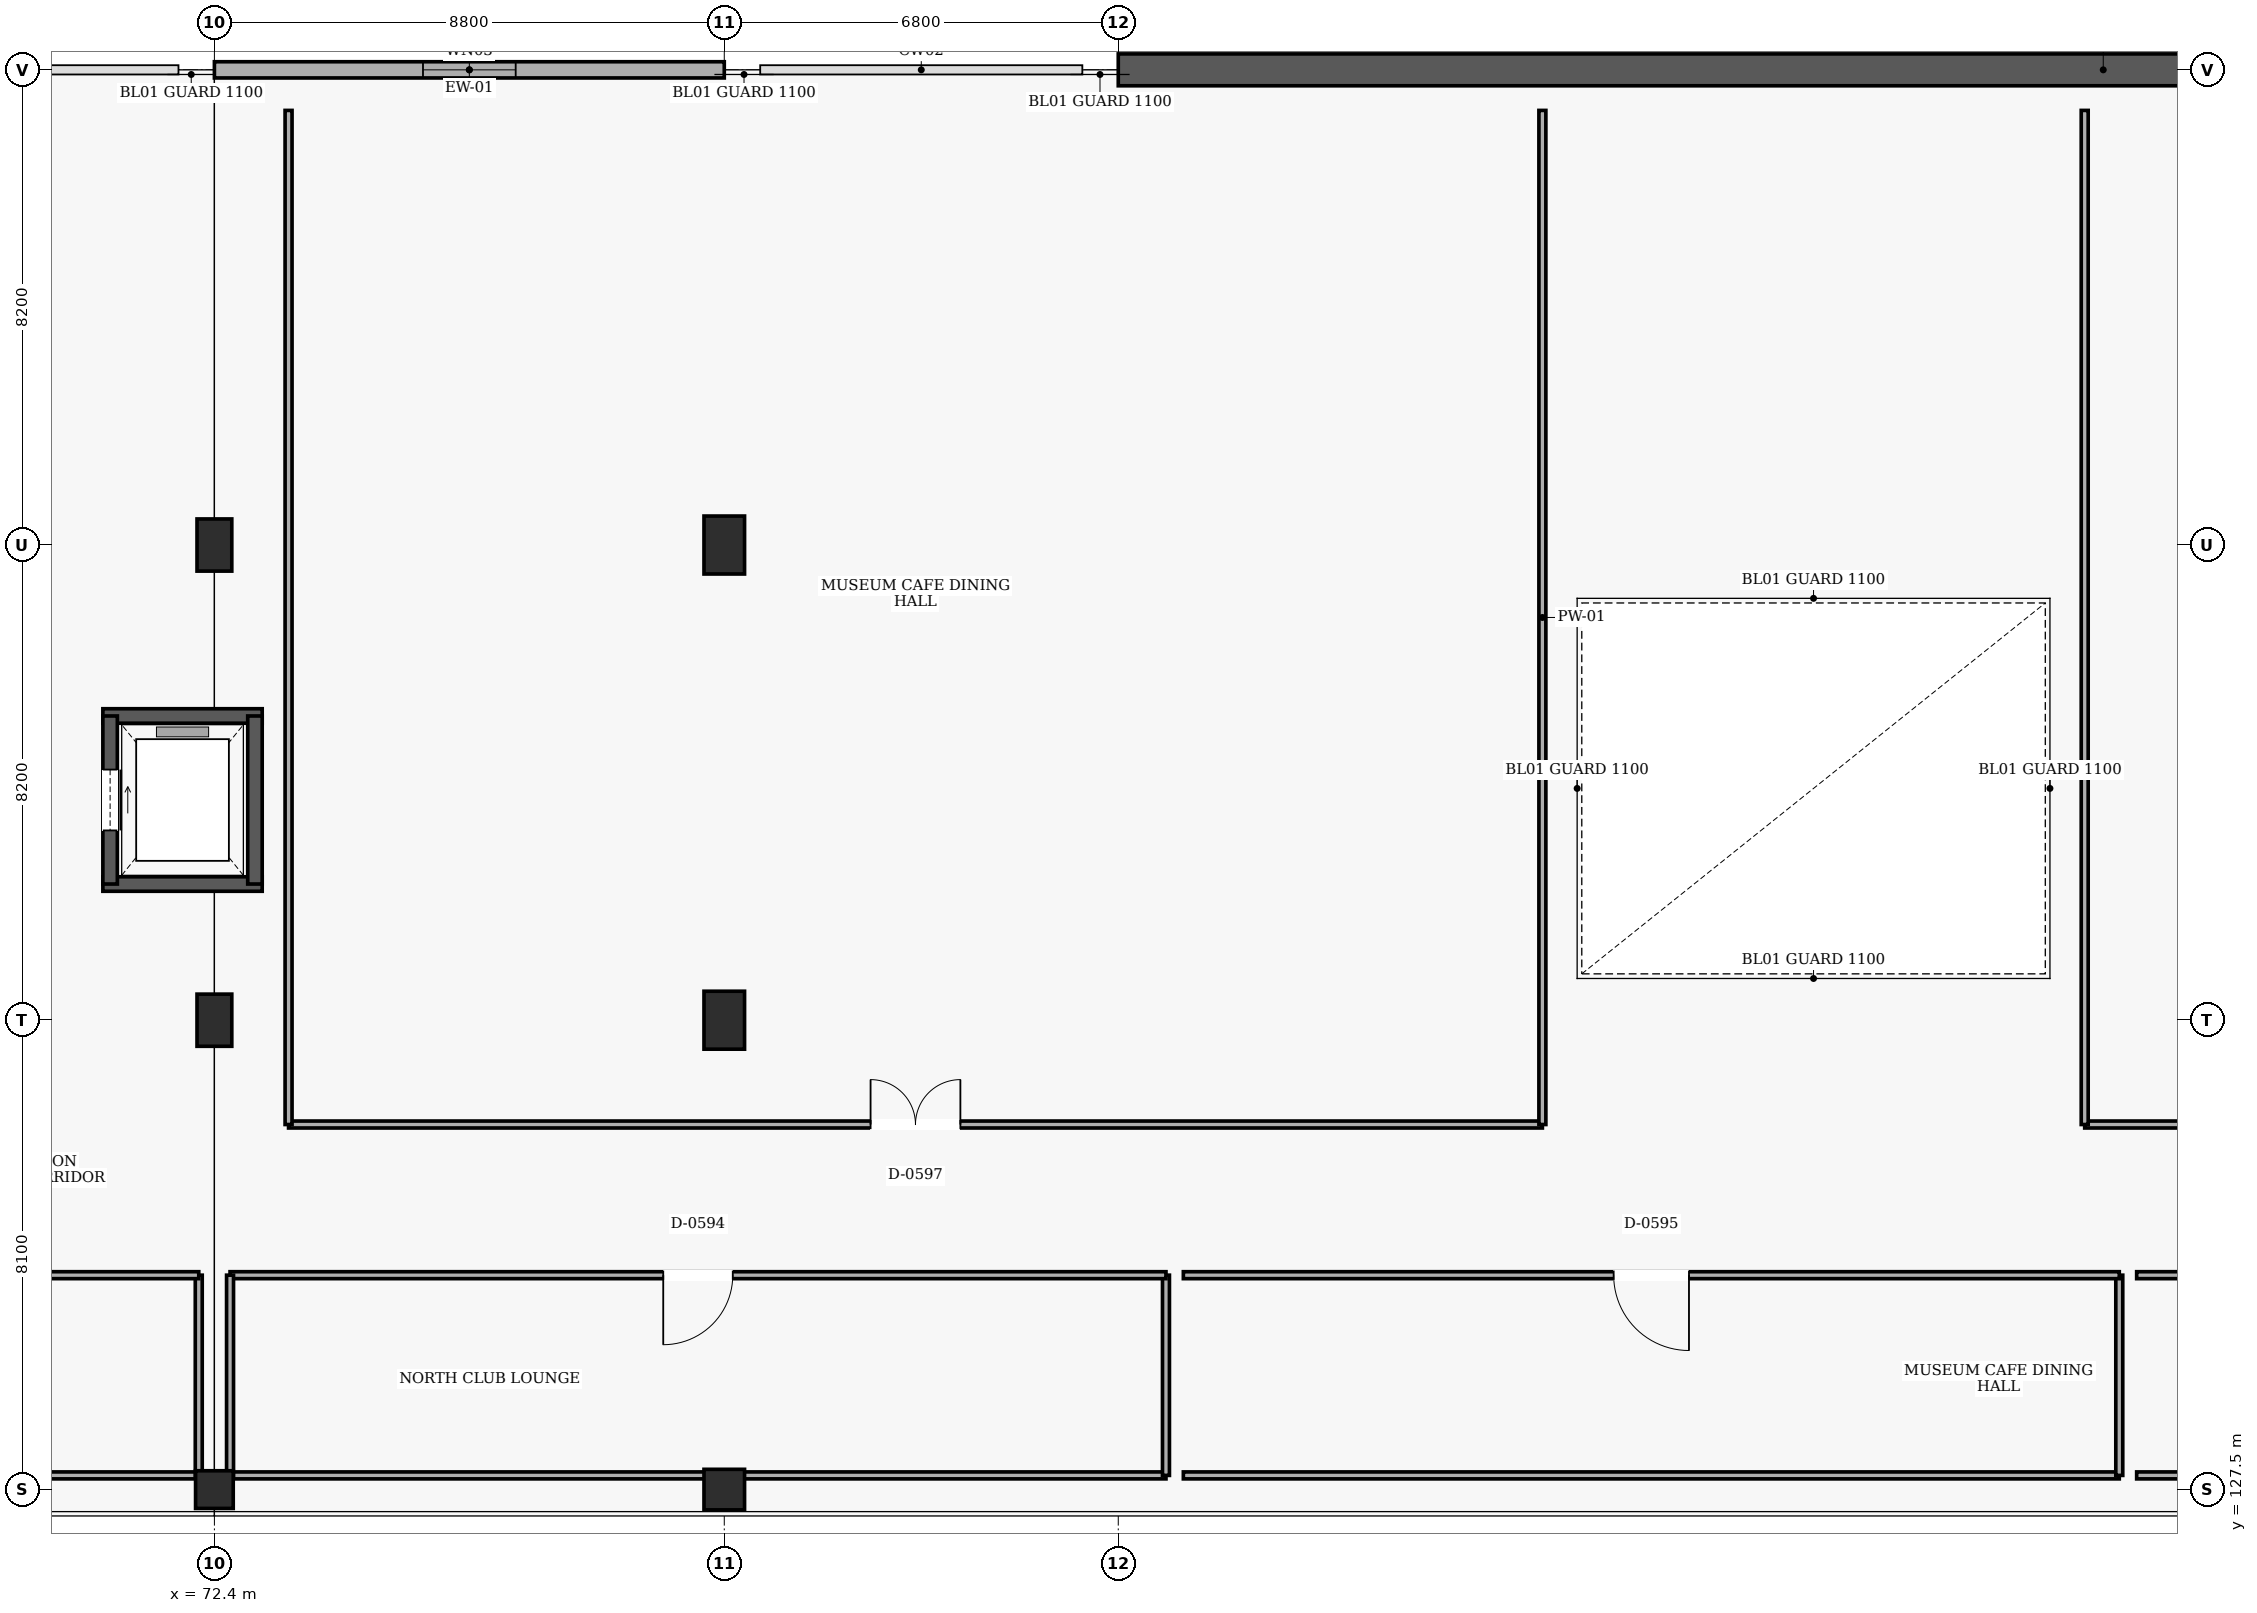
"""IFC4 building model, lengths in metres.
Left out: names, types, materials, properties, quantities, classifications, styles, units other than length and angle.
Written with IfcOpenShell. Run it as: python <this file> out.ifc"""

import sys

from ifc_helpers import new_model, si_unit, direction, frame, frame_2d, origin, origin_2d, place, context, subcontext, project, spatial, rectangle, extrude, element, fill, save


model = new_model("IFC4")
c1 = context("Model", 3, precision=1e-05, world=origin(), true_north=direction((0.0, 1.0)))
c2 = subcontext(c1, "Body", "Model", "MODEL_VIEW")
j1 = project(units=[si_unit("LENGTHUNIT", "METRE"), si_unit("PLANEANGLEUNIT", "RADIAN")], contexts=[c1])
p1 = place(None, origin())
s1 = spatial("IfcSite", under=j1, at=p1, CompositionType="ELEMENT")
p2 = place(p1, origin())
s2 = spatial("IfcBuilding", under=s1, at=p2, CompositionType="ELEMENT")
p3 = place(p2, frame((0.0, 0.0, 10.2)))
s3 = spatial("IfcBuildingStorey", under=s2, at=p3, CompositionType="ELEMENT", Elevation=10.2)
p4 = place(p3, frame((72.4, 127.5, 0.0), z_axis=(0.0, 0.0, 1.0), x_axis=(1.0, 0.0, 0.0)))
e1 = element("IfcColumn", 1, at=p4, inside=s3, PredefinedType="COLUMN", context=c2, shape_type="SweptSolid", body=[
    extrude(rectangle(XDim=0.65, YDim=0.65, at=origin_2d()), origin(), (0.0, 0.0, 1.0), 4.8),
])
for number, where, z_axis, x_axis in (
    (2, (72.4, 135.6, 0.0), (0.0, 0.0, 1.0), (1.0, 0.0, 0.0)),
    (3, (72.4, 143.8, 0.0), (0.0, 0.0, 1.0), (1.0, 0.0, 0.0)),
):
    element("IfcColumn", number, at=place(p3, frame(where, z_axis=z_axis, x_axis=x_axis)), inside=s3, PredefinedType="COLUMN", context=c2, shape_type="SweptSolid", body=[
        extrude(rectangle(XDim=0.6, YDim=0.9, at=origin_2d()), origin(), (0.0, 0.0, 1.0), 4.8),
    ])
p5 = place(p3, frame((81.2, 127.5, 0.0), z_axis=(0.0, 0.0, 1.0), x_axis=(1.0, 0.0, 0.0)))
e4 = element("IfcColumn", 4, at=p5, inside=s3, PredefinedType="COLUMN", context=c2, shape_type="SweptSolid", body=[
    extrude(rectangle(XDim=0.7, YDim=0.7, at=origin_2d()), origin(), (0.0, 0.0, 1.0), 4.8),
])
for number, where, z_axis, x_axis in (
    (5, (81.2, 135.6, 0.0), (0.0, 0.0, 1.0), (1.0, 0.0, 0.0)),
    (6, (81.2, 143.8, 0.0), (0.0, 0.0, 1.0), (1.0, 0.0, 0.0)),
):
    element("IfcColumn", number, at=place(p3, frame(where, z_axis=z_axis, x_axis=x_axis)), inside=s3, PredefinedType="COLUMN", context=c2, shape_type="SweptSolid", body=[
        extrude(rectangle(XDim=0.7, YDim=1.0, at=origin_2d()), origin(), (0.0, 0.0, 1.0), 4.8),
    ])
p6 = place(p3, frame((72.4, 152.0, 0.0), z_axis=(0.0, 0.0, 1.0), x_axis=(1.0, 0.0, 0.0)))
e7 = element("IfcWall", 7, at=p6, inside=s3, PredefinedType="SOLIDWALL", context=c2, shape_type="SweptSolid", body=[
    extrude(rectangle(XDim=8.8, YDim=0.28, at=frame_2d((4.4, 0.0))), origin(), (0.0, 0.0, 1.0), 4.48),
])
p7 = place(p6, frame((3.6, 0.0, 0.9)))
e8 = element("IfcOpeningElement", 8, at=p7, cuts=e7, PredefinedType="OPENING", context=c2, shape_type="SweptSolid", body=[
    extrude(rectangle(XDim=1.6, YDim=1.5, at=frame_2d((0.8, 0.75))), frame((0.0, 0.15, 0.0), z_axis=(0.0, -1.0, 0.0), x_axis=(1.0, 0.0, 0.0)), (0.0, 0.0, 1.0), 0.3),
])
p8 = place(p3, frame((88.0, 152.0, 0.0), z_axis=(0.0, 0.0, 1.0), x_axis=(1.0, 0.0, 0.0)))
e9 = element("IfcWall", 9, at=p8, inside=s3, PredefinedType="SHEAR", context=c2, shape_type="SweptSolid", body=[
    extrude(rectangle(XDim=34.0, YDim=0.55, at=frame_2d((17.0, 0.0))), origin(), (0.0, 0.0, 1.0), 4.48),
])
for number, where, z_axis, x_axis in (
    (10, (70.475, 137.95, 0.0), (0.0, 0.0, 1.0), (1.0, 0.0, 0.0)),
    (11, (73.225, 140.85, 0.0), (0.0, 0.0, 1.0), (-1.0, 0.0, 0.0)),
):
    element("IfcWall", number, at=place(p3, frame(where, z_axis=z_axis, x_axis=x_axis)), inside=s3, PredefinedType="SHEAR", context=c2, shape_type="SweptSolid", body=[
        extrude(rectangle(XDim=2.75, YDim=0.25, at=frame_2d((1.375, 0.0))), origin(), (0.0, 0.0, 1.0), 4.48),
    ])
p9 = place(p3, frame((70.6, 140.85, 0.0), z_axis=(0.0, 0.0, 1.0), x_axis=(0.0, -1.0, 0.0)))
e12 = element("IfcWall", 12, at=p9, inside=s3, PredefinedType="SHEAR", context=c2, shape_type="SweptSolid", body=[
    extrude(rectangle(XDim=2.9, YDim=0.25, at=frame_2d((1.45, 0.0))), origin(), (0.0, 0.0, 1.0), 4.48),
])
p10 = place(p9, frame((0.925, 0.0, 0.0)))
e13 = element("IfcOpeningElement", 13, at=p10, cuts=e12, PredefinedType="OPENING", context=c2, shape_type="SweptSolid", body=[
    extrude(rectangle(XDim=1.05, YDim=2.15, at=frame_2d((0.525, 1.075))), frame((0.0, 0.135, 0.0), z_axis=(0.0, -1.0, 0.0), x_axis=(1.0, 0.0, 0.0)), (0.0, 0.0, 1.0), 0.27),
])
p11 = place(p3, frame((73.1, 137.95, 0.0), z_axis=(0.0, 0.0, 1.0), x_axis=(0.0, 1.0, 0.0)))
e14 = element("IfcWall", 14, at=p11, inside=s3, PredefinedType="SHEAR", context=c2, shape_type="SweptSolid", body=[
    extrude(rectangle(XDim=2.9, YDim=0.25, at=frame_2d((1.45, 0.0))), origin(), (0.0, 0.0, 1.0), 4.48),
])
p12 = place(p3, frame((48.712, 127.745, 0.0), z_axis=(0.0, 0.0, 1.0), x_axis=(1.0, 0.0, 0.0)))
e15 = element("IfcWall", 15, at=p12, inside=s3, PredefinedType="PARTITIONING", context=c2, shape_type="SweptSolid", body=[
    extrude(rectangle(XDim=23.417, YDim=0.12, at=frame_2d((11.709, 0.0))), origin(), (0.0, 0.0, 1.0), 3.86),
])
p13 = place(p3, frame((72.13, 127.745, 0.0), z_axis=(0.0, 0.0, 1.0), x_axis=(0.0, 1.0, 0.0)))
e16 = element("IfcWall", 16, at=p13, inside=s3, PredefinedType="PARTITIONING", context=c2, shape_type="SweptSolid", body=[
    extrude(rectangle(XDim=3.455, YDim=0.12, at=frame_2d((1.728, 0.0))), origin(), (0.0, 0.0, 1.0), 3.76),
])
p14 = place(p3, frame((72.13, 131.2, 0.0), z_axis=(0.0, 0.0, 1.0), x_axis=(-1.0, 0.0, 0.0)))
e17 = element("IfcWall", 17, at=p14, inside=s3, PredefinedType="PARTITIONING", context=c2, shape_type="SweptSolid", body=[
    extrude(rectangle(XDim=23.417, YDim=0.12, at=frame_2d((11.709, 0.0))), origin(), (0.0, 0.0, 1.0), 4.48),
])
p15 = place(p14, frame((11.209, 0.0, 0.0)))
e18 = element("IfcOpeningElement", 18, at=p15, cuts=e17, PredefinedType="OPENING", context=c2, shape_type="SweptSolid", body=[
    extrude(rectangle(XDim=1.0, YDim=2.1, at=frame_2d((0.5, 1.05))), frame((0.0, 0.07, 0.0), z_axis=(0.0, -1.0, 0.0), x_axis=(1.0, 0.0, 0.0)), (0.0, 0.0, 1.0), 0.14),
])
p16 = place(p3, frame((72.67, 127.745, 0.0), z_axis=(0.0, 0.0, 1.0), x_axis=(1.0, 0.0, 0.0)))
e19 = element("IfcWall", 19, at=p16, inside=s3, PredefinedType="PARTITIONING", context=c2, shape_type="SweptSolid", body=[
    extrude(rectangle(XDim=16.153, YDim=0.12, at=frame_2d((8.077, 0.0))), origin(), (0.0, 0.0, 1.0), 3.86),
])
p17 = place(p3, frame((88.823, 127.745, 0.0), z_axis=(0.0, 0.0, 1.0), x_axis=(0.0, 1.0, 0.0)))
e20 = element("IfcWall", 20, at=p17, inside=s3, PredefinedType="PARTITIONING", context=c2, shape_type="SweptSolid", body=[
    extrude(rectangle(XDim=3.455, YDim=0.12, at=frame_2d((1.728, 0.0))), origin(), (0.0, 0.0, 1.0), 4.48),
])
p18 = place(p3, frame((88.823, 131.2, 0.0), z_axis=(0.0, 0.0, 1.0), x_axis=(-1.0, 0.0, 0.0)))
e21 = element("IfcWall", 21, at=p18, inside=s3, PredefinedType="PARTITIONING", context=c2, shape_type="SweptSolid", body=[
    extrude(rectangle(XDim=16.153, YDim=0.12, at=frame_2d((8.077, 0.0))), origin(), (0.0, 0.0, 1.0), 4.48),
])
p19 = place(p18, frame((7.477, 0.0, 0.0)))
e22 = element("IfcOpeningElement", 22, at=p19, cuts=e21, PredefinedType="OPENING", context=c2, shape_type="SweptSolid", body=[
    extrude(rectangle(XDim=1.2, YDim=2.15, at=frame_2d((0.6, 1.075))), frame((0.0, 0.07, 0.0), z_axis=(0.0, -1.0, 0.0), x_axis=(1.0, 0.0, 0.0)), (0.0, 0.0, 1.0), 0.14),
])
p20 = place(p3, frame((72.67, 131.2, 0.0), z_axis=(0.0, 0.0, 1.0), x_axis=(0.0, -1.0, 0.0)))
e23 = element("IfcWall", 23, at=p20, inside=s3, PredefinedType="PARTITIONING", context=c2, shape_type="SweptSolid", body=[
    extrude(rectangle(XDim=3.455, YDim=0.12, at=frame_2d((1.728, 0.0))), origin(), (0.0, 0.0, 1.0), 3.76),
])
p21 = place(p3, frame((89.123, 127.745, 0.0), z_axis=(0.0, 0.0, 1.0), x_axis=(1.0, 0.0, 0.0)))
e24 = element("IfcWall", 24, at=p21, inside=s3, PredefinedType="PARTITIONING", context=c2, shape_type="SweptSolid", body=[
    extrude(rectangle(XDim=16.153, YDim=0.12, at=frame_2d((8.077, 0.0))), origin(), (0.0, 0.0, 1.0), 4.48),
])
p22 = place(p3, frame((105.277, 127.745, 0.0), z_axis=(0.0, 0.0, 1.0), x_axis=(0.0, 1.0, 0.0)))
e25 = element("IfcWall", 25, at=p22, inside=s3, PredefinedType="PARTITIONING", context=c2, shape_type="SweptSolid", body=[
    extrude(rectangle(XDim=3.455, YDim=0.12, at=frame_2d((1.728, 0.0))), origin(), (0.0, 0.0, 1.0), 4.48),
])
p23 = place(p3, frame((105.277, 131.2, 0.0), z_axis=(0.0, 0.0, 1.0), x_axis=(-1.0, 0.0, 0.0)))
e26 = element("IfcWall", 26, at=p23, inside=s3, PredefinedType="PARTITIONING", context=c2, shape_type="SweptSolid", body=[
    extrude(rectangle(XDim=16.153, YDim=0.12, at=frame_2d((8.077, 0.0))), origin(), (0.0, 0.0, 1.0), 4.48),
])
p24 = place(p23, frame((7.427, 0.0, 0.0)))
e27 = element("IfcOpeningElement", 27, at=p24, cuts=e26, PredefinedType="OPENING", context=c2, shape_type="SweptSolid", body=[
    extrude(rectangle(XDim=1.3, YDim=2.2, at=frame_2d((0.65, 1.1))), frame((0.0, 0.07, 0.0), z_axis=(0.0, -1.0, 0.0), x_axis=(1.0, 0.0, 0.0)), (0.0, 0.0, 1.0), 0.14),
])
p25 = place(p3, frame((105.577, 127.745, 0.0), z_axis=(0.0, 0.0, 1.0), x_axis=(1.0, 0.0, 0.0)))
e28 = element("IfcWall", 28, at=p25, inside=s3, PredefinedType="PARTITIONING", context=c2, shape_type="SweptSolid", body=[
    extrude(rectangle(XDim=16.153, YDim=0.12, at=frame_2d((8.077, 0.0))), origin(), (0.0, 0.0, 1.0), 4.48),
])
p26 = place(p3, frame((121.73, 131.2, 0.0), z_axis=(0.0, 0.0, 1.0), x_axis=(-1.0, 0.0, 0.0)))
e29 = element("IfcWall", 29, at=p26, inside=s3, PredefinedType="PARTITIONING", context=c2, shape_type="SweptSolid", body=[
    extrude(rectangle(XDim=16.153, YDim=0.12, at=frame_2d((8.077, 0.0))), origin(), (0.0, 0.0, 1.0), 4.48),
])
p27 = place(p26, frame((7.377, 0.0, 0.0)))
e30 = element("IfcOpeningElement", 30, at=p27, cuts=e29, PredefinedType="OPENING", context=c2, shape_type="SweptSolid", body=[
    extrude(rectangle(XDim=1.4, YDim=2.2, at=frame_2d((0.7, 1.1))), frame((0.0, 0.07, 0.0), z_axis=(0.0, -1.0, 0.0), x_axis=(1.0, 0.0, 0.0)), (0.0, 0.0, 1.0), 0.14),
])
p28 = place(p3, frame((73.68, 133.8, 0.0), z_axis=(0.0, 0.0, 1.0), x_axis=(1.0, 0.0, 0.0)))
e31 = element("IfcWall", 31, at=p28, inside=s3, PredefinedType="PARTITIONING", context=c2, shape_type="SweptSolid", body=[
    extrude(rectangle(XDim=21.64, YDim=0.12, at=frame_2d((10.82, 0.0))), origin(), (0.0, 0.0, 1.0), 4.48),
])
p29 = place(p28, frame((10.045, 0.0, 0.0)))
e32 = element("IfcOpeningElement", 32, at=p29, cuts=e31, PredefinedType="OPENING", context=c2, shape_type="SweptSolid", body=[
    extrude(rectangle(XDim=1.55, YDim=2.2, at=frame_2d((0.775, 1.1))), frame((0.0, 0.07, 0.0), z_axis=(0.0, -1.0, 0.0), x_axis=(1.0, 0.0, 0.0)), (0.0, 0.0, 1.0), 0.14),
])
for number, where, z_axis, x_axis in (
    (33, (95.32, 133.8, 0.0), (0.0, 0.0, 1.0), (0.0, 1.0, 0.0)),
    (34, (73.68, 151.3, 0.0), (0.0, 0.0, 1.0), (0.0, -1.0, 0.0)),
):
    element("IfcWall", number, at=place(p3, frame(where, z_axis=z_axis, x_axis=x_axis)), inside=s3, PredefinedType="PARTITIONING", context=c2, shape_type="SweptSolid", body=[
        extrude(rectangle(XDim=17.5, YDim=0.12, at=frame_2d((8.75, 0.0))), origin(), (0.0, 0.0, 1.0), 4.48),
    ])
p30 = place(p3, frame((104.68, 133.8, 0.0), z_axis=(0.0, 0.0, 1.0), x_axis=(1.0, 0.0, 0.0)))
e35 = element("IfcWall", 35, at=p30, inside=s3, PredefinedType="PARTITIONING", context=c2, shape_type="SweptSolid", body=[
    extrude(rectangle(XDim=17.05, YDim=0.12, at=frame_2d((8.525, 0.0))), origin(), (0.0, 0.0, 1.0), 4.48),
])
p31 = place(p30, frame((7.685, 0.0, 0.0)))
e36 = element("IfcOpeningElement", 36, at=p31, cuts=e35, PredefinedType="OPENING", context=c2, shape_type="SweptSolid", body=[
    extrude(rectangle(XDim=1.68, YDim=2.25, at=frame_2d((0.84, 1.125))), frame((0.0, 0.07, 0.0), z_axis=(0.0, -1.0, 0.0), x_axis=(1.0, 0.0, 0.0)), (0.0, 0.0, 1.0), 0.14),
])
p32 = place(p3, frame((104.68, 151.3, 0.0), z_axis=(0.0, 0.0, 1.0), x_axis=(0.0, -1.0, 0.0)))
e37 = element("IfcWall", 37, at=p32, inside=s3, PredefinedType="PARTITIONING", context=c2, shape_type="SweptSolid", body=[
    extrude(rectangle(XDim=17.5, YDim=0.12, at=frame_2d((8.75, 0.0))), origin(), (0.0, 0.0, 1.0), 4.48),
])
p33 = place(p7, origin())
e38 = element("IfcWindow", 38, at=p33, inside=s3, PartitioningType="SINGLE_PANEL", PredefinedType="WINDOW", context=c2, shape_type="SweptSolid", body=[
    extrude(rectangle(XDim=1.6, YDim=1.5, at=frame_2d((0.8, 0.75))), frame((0.0, 0.03, 0.0), z_axis=(0.0, -1.0, 0.0), x_axis=(1.0, 0.0, 0.0)), (0.0, 0.0, 1.0), 0.06),
])
fill(e8, e38)
p34 = place(p10, origin())
e39 = element("IfcDoor", 39, at=p34, inside=s3, OperationType="SLIDING_TO_RIGHT", PredefinedType="DOOR", context=c2, shape_type="SweptSolid", body=[
    extrude(rectangle(XDim=1.05, YDim=2.15, at=frame_2d((0.525, 1.075))), frame((0.0, 0.025, 0.0), z_axis=(0.0, -1.0, 0.0), x_axis=(1.0, 0.0, 0.0)), (0.0, 0.0, 1.0), 0.05),
])
fill(e13, e39)
p35 = place(p19, origin())
e40 = element("IfcDoor", 40, at=p35, inside=s3, OperationType="SINGLE_SWING_RIGHT", PredefinedType="DOOR", context=c2, shape_type="SweptSolid", body=[
    extrude(rectangle(XDim=1.2, YDim=2.15, at=frame_2d((0.6, 1.075))), frame((0.0, 0.025, 0.0), z_axis=(0.0, -1.0, 0.0), x_axis=(1.0, 0.0, 0.0)), (0.0, 0.0, 1.0), 0.05),
])
fill(e22, e40)
p36 = place(p24, origin())
e41 = element("IfcDoor", 41, at=p36, inside=s3, OperationType="SINGLE_SWING_LEFT", PredefinedType="DOOR", context=c2, shape_type="SweptSolid", body=[
    extrude(rectangle(XDim=1.3, YDim=2.2, at=frame_2d((0.65, 1.1))), frame((0.0, 0.025, 0.0), z_axis=(0.0, -1.0, 0.0), x_axis=(1.0, 0.0, 0.0)), (0.0, 0.0, 1.0), 0.05),
])
fill(e27, e41)
p37 = place(p29, origin())
e42 = element("IfcDoor", 42, at=p37, inside=s3, OperationType="DOUBLE_DOOR_SINGLE_SWING", PredefinedType="DOOR", context=c2, shape_type="SweptSolid", body=[
    extrude(rectangle(XDim=1.55, YDim=2.2, at=frame_2d((0.775, 1.1))), frame((0.0, 0.025, 0.0), z_axis=(0.0, -1.0, 0.0), x_axis=(1.0, 0.0, 0.0)), (0.0, 0.0, 1.0), 0.05),
])
fill(e32, e42)
save(model, sys.argv[1])
